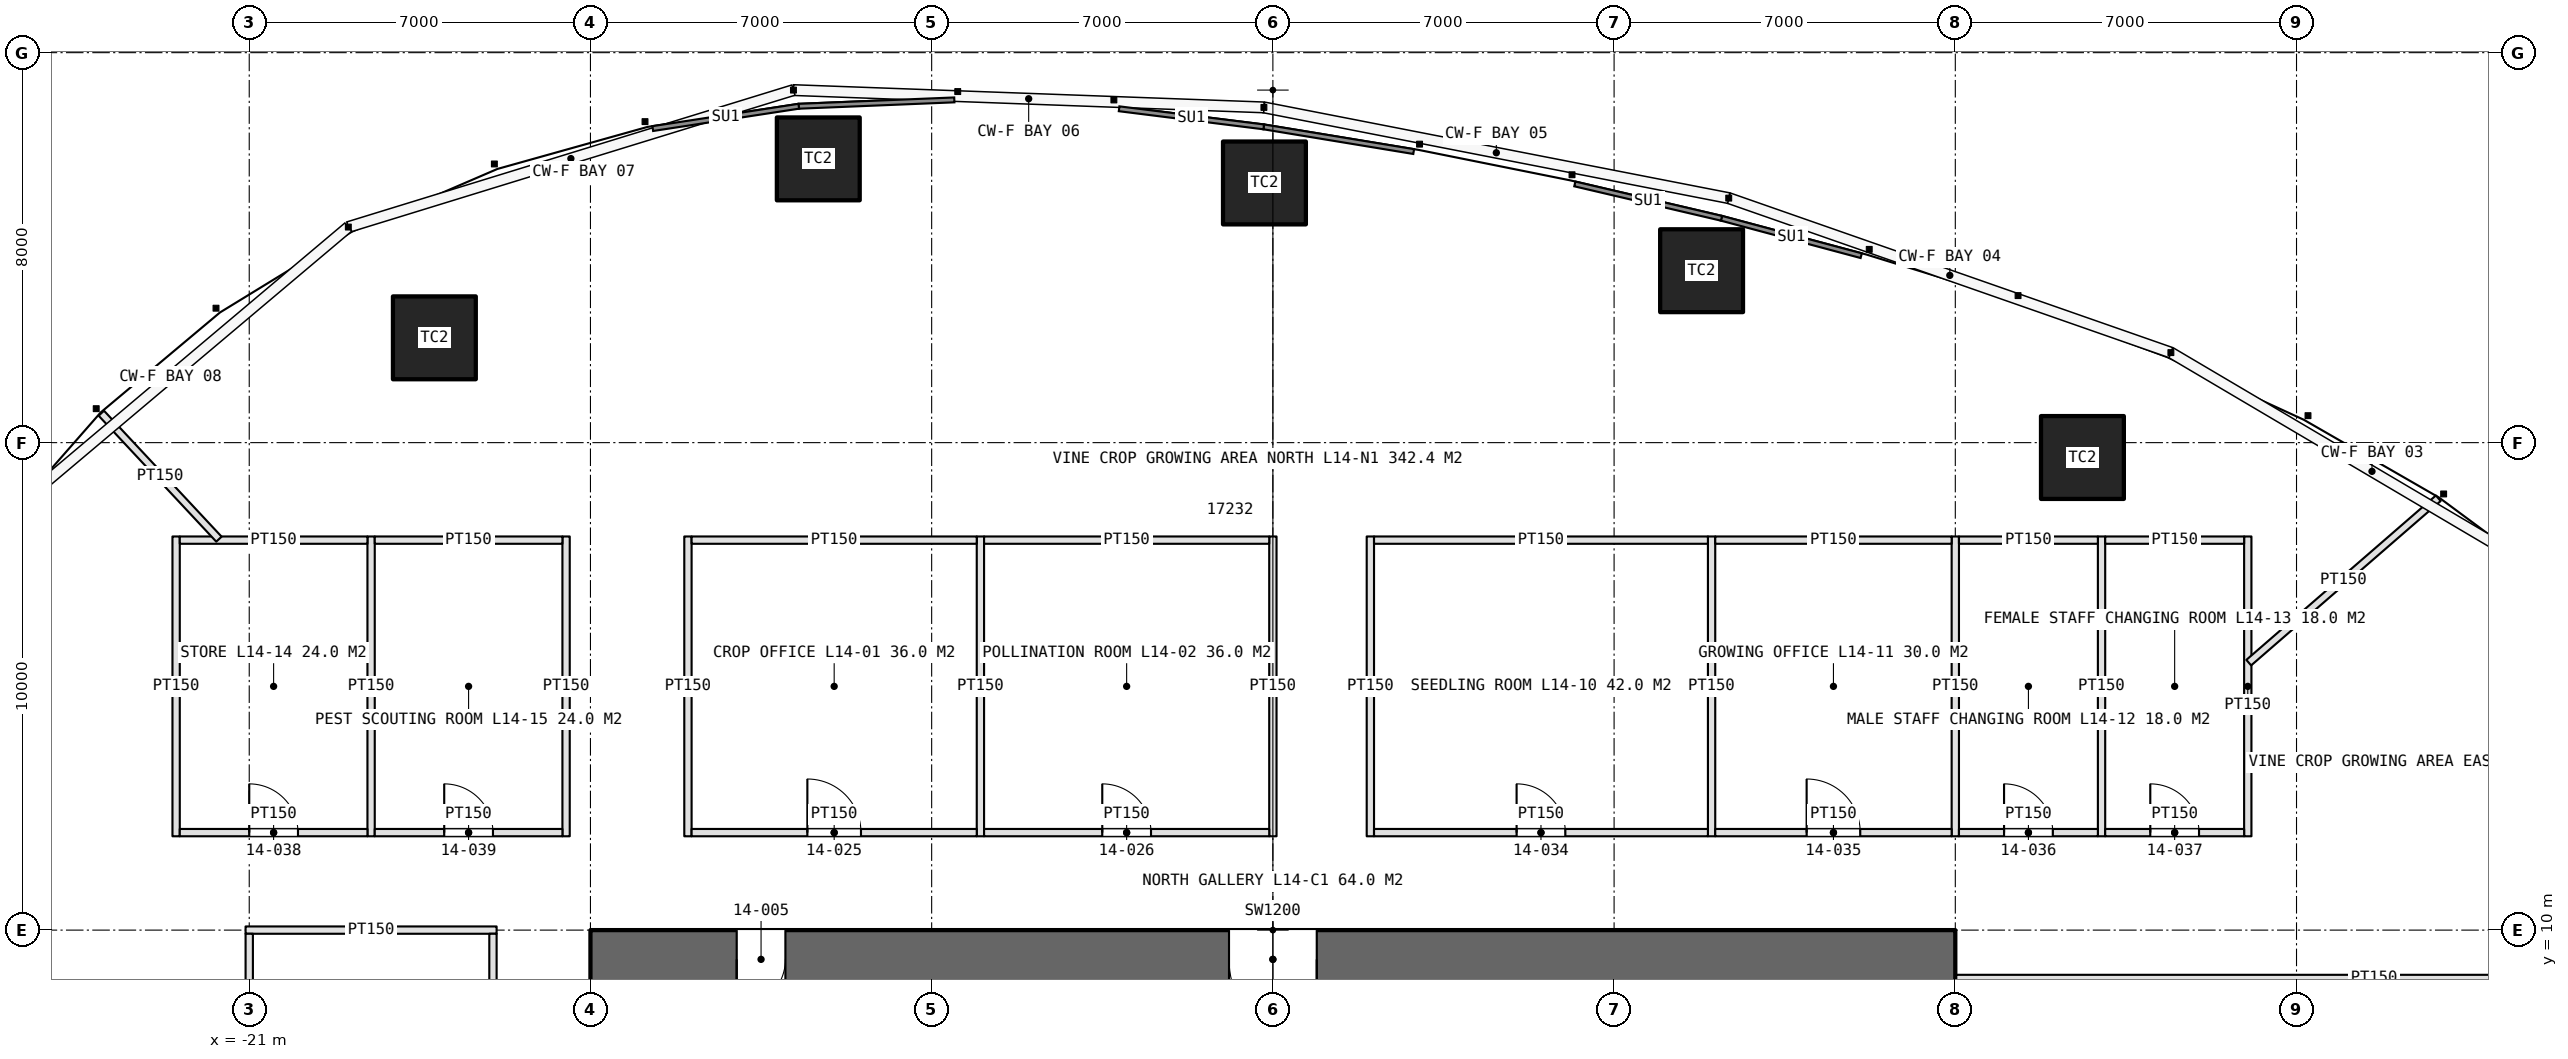
"""IFC4 building model, lengths in metres.
Left out: names, types, materials, properties, quantities, classifications, styles, units other than length and angle.
Written with IfcOpenShell. Run it as: python <this file> out.ifc"""

import sys

from ifc_helpers import new_model, si_unit, direction, frame, frame_2d, origin, origin_2d, place, context, subcontext, project, spatial, rectangle, extrude, element, fill, save


model = new_model("IFC4")
c1 = context("Model", 3, precision=1e-05, world=origin(), true_north=direction((0.0, 1.0)))
c2 = subcontext(c1, "Body", "Model", "MODEL_VIEW")
j1 = project(units=[si_unit("LENGTHUNIT", "METRE"), si_unit("PLANEANGLEUNIT", "RADIAN")], contexts=[c1])
p1 = place(None, origin())
s1 = spatial("IfcSite", under=j1, at=p1, CompositionType="ELEMENT")
p2 = place(p1, origin())
s2 = spatial("IfcBuilding", under=s1, at=p2, CompositionType="ELEMENT")
p3 = place(p2, frame((0.0, 0.0, 70.0)))
s3 = spatial("IfcBuildingStorey", under=s2, at=p3, CompositionType="ELEMENT", Elevation=70.0)
p4 = place(p3, frame((14.0, 9.4, 0.0), z_axis=(0.0, 0.0, 1.0), x_axis=(-1.0, 0.0, 0.0)))
e1 = element("IfcWall", 1, at=p4, inside=s3, PredefinedType="SHEAR", context=c2, shape_type="SweptSolid", body=[
    extrude(rectangle(XDim=28.0, YDim=1.2, at=frame_2d((14.0, 0.0))), origin(), (0.0, 0.0, 1.0), 5.0),
])
p5 = place(p4, frame((24.0, 0.0, 0.0)))
e2 = element("IfcOpeningElement", 2, at=p5, cuts=e1, PredefinedType="OPENING", context=c2, shape_type="SweptSolid", body=[
    extrude(rectangle(XDim=1.0, YDim=2.4, at=frame_2d((0.5, 1.2))), frame((0.0, 0.61, 0.0), z_axis=(0.0, -1.0, 0.0), x_axis=(1.0, 0.0, 0.0)), (0.0, 0.0, 1.0), 1.22),
])
p6 = place(p4, frame((13.1, 0.0, 0.0)))
e3 = element("IfcOpeningElement", 3, at=p6, cuts=e1, PredefinedType="OPENING", context=c2, shape_type="SweptSolid", body=[
    extrude(rectangle(XDim=1.8, YDim=2.4, at=frame_2d((0.9, 1.2))), frame((0.0, 0.61, 0.0), z_axis=(0.0, -1.0, 0.0), x_axis=(1.0, 0.0, 0.0)), (0.0, 0.0, 1.0), 1.22),
])
for number, where, z_axis, x_axis in (
    (4, (16.608, 19.695, 0.0), (0.0, 0.0, 1.0), (1.0, 0.0, 0.0)),
    (5, (8.795, 23.527, 0.0), (0.0, 0.0, 1.0), (1.0, 0.0, 0.0)),
    (6, (-0.173, 25.327, 0.0), (0.0, 0.0, 1.0), (1.0, 0.0, 0.0)),
    (7, (-9.326, 25.821, 0.0), (0.0, 0.0, 1.0), (1.0, 0.0, 0.0)),
    (8, (-17.202, 22.15, 0.0), (0.0, 0.0, 1.0), (1.0, 0.0, 0.0)),
):
    element("IfcColumn", number, at=place(p3, frame(where, z_axis=z_axis, x_axis=x_axis)), inside=s3, PredefinedType="COLUMN", context=c2, shape_type="SweptSolid", body=[
        extrude(rectangle(XDim=1.7, YDim=1.7, at=origin_2d()), origin(), (0.0, 0.0, 1.0), 5.0),
    ])
for number, where, z_axis, x_axis in (
    (9, (-12.0, 11.925, 0.0), (0.0, 0.0, 1.0), (0.0, 1.0, 0.0)),
    (10, (-6.0, 11.925, 0.0), (0.0, 0.0, 1.0), (0.0, 1.0, 0.0)),
    (11, (0.0, 11.925, 0.0), (0.0, 0.0, 1.0), (0.0, 1.0, 0.0)),
):
    element("IfcWall", number, at=place(p3, frame(where, z_axis=z_axis, x_axis=x_axis)), inside=s3, PredefinedType="PARTITIONING", context=c2, shape_type="SweptSolid", body=[
        extrude(rectangle(XDim=6.15, YDim=0.15, at=frame_2d((3.075, 0.0))), origin(), (0.0, 0.0, 1.0), 3.6),
    ])
p7 = place(p3, frame((-11.925, 12.0, 0.0), z_axis=(0.0, 0.0, 1.0), x_axis=(1.0, 0.0, 0.0)))
e12 = element("IfcWall", 12, at=p7, inside=s3, PredefinedType="PARTITIONING", context=c2, shape_type="SweptSolid", body=[
    extrude(rectangle(XDim=5.85, YDim=0.15, at=frame_2d((2.925, 0.0))), origin(), (0.0, 0.0, 1.0), 3.6),
])
p8 = place(p7, frame((2.375, 0.0, 0.0)))
e13 = element("IfcOpeningElement", 13, at=p8, cuts=e12, PredefinedType="OPENING", context=c2, shape_type="SweptSolid", body=[
    extrude(rectangle(XDim=1.1, YDim=2.3, at=frame_2d((0.55, 1.15))), frame((0.0, 0.085, 0.0), z_axis=(0.0, -1.0, 0.0), x_axis=(1.0, 0.0, 0.0)), (0.0, 0.0, 1.0), 0.17),
])
p9 = place(p3, frame((-11.925, 18.0, 0.0), z_axis=(0.0, 0.0, 1.0), x_axis=(1.0, 0.0, 0.0)))
e14 = element("IfcWall", 14, at=p9, inside=s3, PredefinedType="PARTITIONING", context=c2, shape_type="SweptSolid", body=[
    extrude(rectangle(XDim=5.85, YDim=0.15, at=frame_2d((2.925, 0.0))), origin(), (0.0, 0.0, 1.0), 3.6),
])
p10 = place(p3, frame((-5.925, 12.0, 0.0), z_axis=(0.0, 0.0, 1.0), x_axis=(1.0, 0.0, 0.0)))
e15 = element("IfcWall", 15, at=p10, inside=s3, PredefinedType="PARTITIONING", context=c2, shape_type="SweptSolid", body=[
    extrude(rectangle(XDim=5.85, YDim=0.15, at=frame_2d((2.925, 0.0))), origin(), (0.0, 0.0, 1.0), 3.6),
])
p11 = place(p10, frame((2.425, 0.0, 0.0)))
e16 = element("IfcOpeningElement", 16, at=p11, cuts=e15, PredefinedType="OPENING", context=c2, shape_type="SweptSolid", body=[
    extrude(rectangle(XDim=1.0, YDim=2.2, at=frame_2d((0.5, 1.1))), frame((0.0, 0.085, 0.0), z_axis=(0.0, -1.0, 0.0), x_axis=(1.0, 0.0, 0.0)), (0.0, 0.0, 1.0), 0.17),
])
p12 = place(p3, frame((-5.925, 18.0, 0.0), z_axis=(0.0, 0.0, 1.0), x_axis=(1.0, 0.0, 0.0)))
e17 = element("IfcWall", 17, at=p12, inside=s3, PredefinedType="PARTITIONING", context=c2, shape_type="SweptSolid", body=[
    extrude(rectangle(XDim=5.85, YDim=0.15, at=frame_2d((2.925, 0.0))), origin(), (0.0, 0.0, 1.0), 3.6),
])
for number, where, z_axis, x_axis in (
    (18, (2.0, 11.925, 0.0), (0.0, 0.0, 1.0), (0.0, 1.0, 0.0)),
    (19, (9.0, 11.925, 0.0), (0.0, 0.0, 1.0), (0.0, 1.0, 0.0)),
    (20, (14.0, 11.925, 0.0), (0.0, 0.0, 1.0), (0.0, 1.0, 0.0)),
    (21, (17.0, 11.925, 0.0), (0.0, 0.0, 1.0), (0.0, 1.0, 0.0)),
    (22, (20.0, 11.925, 0.0), (0.0, 0.0, 1.0), (0.0, 1.0, 0.0)),
):
    element("IfcWall", number, at=place(p3, frame(where, z_axis=z_axis, x_axis=x_axis)), inside=s3, PredefinedType="PARTITIONING", context=c2, shape_type="SweptSolid", body=[
        extrude(rectangle(XDim=6.15, YDim=0.15, at=frame_2d((3.075, 0.0))), origin(), (0.0, 0.0, 1.0), 3.6),
    ])
p13 = place(p3, frame((2.075, 12.0, 0.0), z_axis=(0.0, 0.0, 1.0), x_axis=(1.0, 0.0, 0.0)))
e23 = element("IfcWall", 23, at=p13, inside=s3, PredefinedType="PARTITIONING", context=c2, shape_type="SweptSolid", body=[
    extrude(rectangle(XDim=6.85, YDim=0.15, at=frame_2d((3.425, 0.0))), origin(), (0.0, 0.0, 1.0), 3.6),
])
p14 = place(p13, frame((2.925, 0.0, 0.0)))
e24 = element("IfcOpeningElement", 24, at=p14, cuts=e23, PredefinedType="OPENING", context=c2, shape_type="SweptSolid", body=[
    extrude(rectangle(XDim=1.0, YDim=2.2, at=frame_2d((0.5, 1.1))), frame((0.0, 0.085, 0.0), z_axis=(0.0, -1.0, 0.0), x_axis=(1.0, 0.0, 0.0)), (0.0, 0.0, 1.0), 0.17),
])
p15 = place(p3, frame((2.075, 18.0, 0.0), z_axis=(0.0, 0.0, 1.0), x_axis=(1.0, 0.0, 0.0)))
e25 = element("IfcWall", 25, at=p15, inside=s3, PredefinedType="PARTITIONING", context=c2, shape_type="SweptSolid", body=[
    extrude(rectangle(XDim=6.85, YDim=0.15, at=frame_2d((3.425, 0.0))), origin(), (0.0, 0.0, 1.0), 3.6),
])
p16 = place(p3, frame((9.075, 12.0, 0.0), z_axis=(0.0, 0.0, 1.0), x_axis=(1.0, 0.0, 0.0)))
e26 = element("IfcWall", 26, at=p16, inside=s3, PredefinedType="PARTITIONING", context=c2, shape_type="SweptSolid", body=[
    extrude(rectangle(XDim=4.85, YDim=0.15, at=frame_2d((2.425, 0.0))), origin(), (0.0, 0.0, 1.0), 3.6),
])
p17 = place(p16, frame((1.875, 0.0, 0.0)))
e27 = element("IfcOpeningElement", 27, at=p17, cuts=e26, PredefinedType="OPENING", context=c2, shape_type="SweptSolid", body=[
    extrude(rectangle(XDim=1.1, YDim=2.3, at=frame_2d((0.55, 1.15))), frame((0.0, 0.085, 0.0), z_axis=(0.0, -1.0, 0.0), x_axis=(1.0, 0.0, 0.0)), (0.0, 0.0, 1.0), 0.17),
])
p18 = place(p3, frame((9.075, 18.0, 0.0), z_axis=(0.0, 0.0, 1.0), x_axis=(1.0, 0.0, 0.0)))
e28 = element("IfcWall", 28, at=p18, inside=s3, PredefinedType="PARTITIONING", context=c2, shape_type="SweptSolid", body=[
    extrude(rectangle(XDim=4.85, YDim=0.15, at=frame_2d((2.425, 0.0))), origin(), (0.0, 0.0, 1.0), 3.6),
])
p19 = place(p3, frame((14.075, 12.0, 0.0), z_axis=(0.0, 0.0, 1.0), x_axis=(1.0, 0.0, 0.0)))
e29 = element("IfcWall", 29, at=p19, inside=s3, PredefinedType="PARTITIONING", context=c2, shape_type="SweptSolid", body=[
    extrude(rectangle(XDim=2.85, YDim=0.15, at=frame_2d((1.425, 0.0))), origin(), (0.0, 0.0, 1.0), 3.6),
])
p20 = place(p19, frame((0.925, 0.0, 0.0)))
e30 = element("IfcOpeningElement", 30, at=p20, cuts=e29, PredefinedType="OPENING", context=c2, shape_type="SweptSolid", body=[
    extrude(rectangle(XDim=1.0, YDim=2.2, at=frame_2d((0.5, 1.1))), frame((0.0, 0.085, 0.0), z_axis=(0.0, -1.0, 0.0), x_axis=(1.0, 0.0, 0.0)), (0.0, 0.0, 1.0), 0.17),
])
p21 = place(p3, frame((14.075, 18.0, 0.0), z_axis=(0.0, 0.0, 1.0), x_axis=(1.0, 0.0, 0.0)))
e31 = element("IfcWall", 31, at=p21, inside=s3, PredefinedType="PARTITIONING", context=c2, shape_type="SweptSolid", body=[
    extrude(rectangle(XDim=2.85, YDim=0.15, at=frame_2d((1.425, 0.0))), origin(), (0.0, 0.0, 1.0), 3.6),
])
p22 = place(p3, frame((17.075, 12.0, 0.0), z_axis=(0.0, 0.0, 1.0), x_axis=(1.0, 0.0, 0.0)))
e32 = element("IfcWall", 32, at=p22, inside=s3, PredefinedType="PARTITIONING", context=c2, shape_type="SweptSolid", body=[
    extrude(rectangle(XDim=2.85, YDim=0.15, at=frame_2d((1.425, 0.0))), origin(), (0.0, 0.0, 1.0), 3.6),
])
p23 = place(p22, frame((0.925, 0.0, 0.0)))
e33 = element("IfcOpeningElement", 33, at=p23, cuts=e32, PredefinedType="OPENING", context=c2, shape_type="SweptSolid", body=[
    extrude(rectangle(XDim=1.0, YDim=2.2, at=frame_2d((0.5, 1.1))), frame((0.0, 0.085, 0.0), z_axis=(0.0, -1.0, 0.0), x_axis=(1.0, 0.0, 0.0)), (0.0, 0.0, 1.0), 0.17),
])
p24 = place(p3, frame((17.075, 18.0, 0.0), z_axis=(0.0, 0.0, 1.0), x_axis=(1.0, 0.0, 0.0)))
e34 = element("IfcWall", 34, at=p24, inside=s3, PredefinedType="PARTITIONING", context=c2, shape_type="SweptSolid", body=[
    extrude(rectangle(XDim=2.85, YDim=0.15, at=frame_2d((1.425, 0.0))), origin(), (0.0, 0.0, 1.0), 3.6),
])
for number, where, z_axis, x_axis in (
    (35, (-22.5, 11.925, 0.0), (0.0, 0.0, 1.0), (0.0, 1.0, 0.0)),
    (36, (-18.5, 11.925, 0.0), (0.0, 0.0, 1.0), (0.0, 1.0, 0.0)),
    (37, (-14.5, 11.925, 0.0), (0.0, 0.0, 1.0), (0.0, 1.0, 0.0)),
):
    element("IfcWall", number, at=place(p3, frame(where, z_axis=z_axis, x_axis=x_axis)), inside=s3, PredefinedType="PARTITIONING", context=c2, shape_type="SweptSolid", body=[
        extrude(rectangle(XDim=6.15, YDim=0.15, at=frame_2d((3.075, 0.0))), origin(), (0.0, 0.0, 1.0), 3.6),
    ])
p25 = place(p3, frame((-22.425, 12.0, 0.0), z_axis=(0.0, 0.0, 1.0), x_axis=(1.0, 0.0, 0.0)))
e38 = element("IfcWall", 38, at=p25, inside=s3, PredefinedType="PARTITIONING", context=c2, shape_type="SweptSolid", body=[
    extrude(rectangle(XDim=3.85, YDim=0.15, at=frame_2d((1.925, 0.0))), origin(), (0.0, 0.0, 1.0), 3.6),
])
p26 = place(p25, frame((1.425, 0.0, 0.0)))
e39 = element("IfcOpeningElement", 39, at=p26, cuts=e38, PredefinedType="OPENING", context=c2, shape_type="SweptSolid", body=[
    extrude(rectangle(XDim=1.0, YDim=2.2, at=frame_2d((0.5, 1.1))), frame((0.0, 0.085, 0.0), z_axis=(0.0, -1.0, 0.0), x_axis=(1.0, 0.0, 0.0)), (0.0, 0.0, 1.0), 0.17),
])
p27 = place(p3, frame((-22.425, 18.0, 0.0), z_axis=(0.0, 0.0, 1.0), x_axis=(1.0, 0.0, 0.0)))
e40 = element("IfcWall", 40, at=p27, inside=s3, PredefinedType="PARTITIONING", context=c2, shape_type="SweptSolid", body=[
    extrude(rectangle(XDim=3.85, YDim=0.15, at=frame_2d((1.925, 0.0))), origin(), (0.0, 0.0, 1.0), 3.6),
])
p28 = place(p3, frame((-18.425, 12.0, 0.0), z_axis=(0.0, 0.0, 1.0), x_axis=(1.0, 0.0, 0.0)))
e41 = element("IfcWall", 41, at=p28, inside=s3, PredefinedType="PARTITIONING", context=c2, shape_type="SweptSolid", body=[
    extrude(rectangle(XDim=3.85, YDim=0.15, at=frame_2d((1.925, 0.0))), origin(), (0.0, 0.0, 1.0), 3.6),
])
p29 = place(p28, frame((1.425, 0.0, 0.0)))
e42 = element("IfcOpeningElement", 42, at=p29, cuts=e41, PredefinedType="OPENING", context=c2, shape_type="SweptSolid", body=[
    extrude(rectangle(XDim=1.0, YDim=2.2, at=frame_2d((0.5, 1.1))), frame((0.0, 0.085, 0.0), z_axis=(0.0, -1.0, 0.0), x_axis=(1.0, 0.0, 0.0)), (0.0, 0.0, 1.0), 0.17),
])
p30 = place(p3, frame((-18.425, 18.0, 0.0), z_axis=(0.0, 0.0, 1.0), x_axis=(1.0, 0.0, 0.0)))
e43 = element("IfcWall", 43, at=p30, inside=s3, PredefinedType="PARTITIONING", context=c2, shape_type="SweptSolid", body=[
    extrude(rectangle(XDim=3.85, YDim=0.15, at=frame_2d((1.925, 0.0))), origin(), (0.0, 0.0, 1.0), 3.6),
])
p31 = place(p3, frame((-15.925, 10.0, 0.0), z_axis=(0.0, 0.0, 1.0), x_axis=(-1.0, 0.0, 0.0)))
e44 = element("IfcWall", 44, at=p31, inside=s3, PredefinedType="PARTITIONING", context=c2, shape_type="SweptSolid", body=[
    extrude(rectangle(XDim=5.15, YDim=0.15, at=frame_2d((2.575, 0.0))), origin(), (0.0, 0.0, 1.0), 3.6),
])
p32 = place(p3, frame((-16.0, 3.075, 0.0), z_axis=(0.0, 0.0, 1.0), x_axis=(0.0, 1.0, 0.0)))
e45 = element("IfcWall", 45, at=p32, inside=s3, PredefinedType="PARTITIONING", context=c2, shape_type="SweptSolid", body=[
    extrude(rectangle(XDim=6.85, YDim=0.15, at=frame_2d((3.425, 0.0))), origin(), (0.0, 0.0, 1.0), 3.6),
])
p33 = place(p32, frame((2.825, 0.0, 0.0)))
e46 = element("IfcOpeningElement", 46, at=p33, cuts=e45, PredefinedType="OPENING", context=c2, shape_type="SweptSolid", body=[
    extrude(rectangle(XDim=1.2, YDim=2.3, at=frame_2d((0.6, 1.15))), frame((0.0, 0.085, 0.0), z_axis=(0.0, -1.0, 0.0), x_axis=(1.0, 0.0, 0.0)), (0.0, 0.0, 1.0), 0.17),
])
p34 = place(p3, frame((-21.0, 3.075, 0.0), z_axis=(0.0, 0.0, 1.0), x_axis=(0.0, 1.0, 0.0)))
e47 = element("IfcWall", 47, at=p34, inside=s3, PredefinedType="PARTITIONING", context=c2, shape_type="SweptSolid", body=[
    extrude(rectangle(XDim=6.85, YDim=0.15, at=frame_2d((3.425, 0.0))), origin(), (0.0, 0.0, 1.0), 3.6),
])
p35 = place(p3, frame((-21.622, 18.02, 0.0), z_axis=(0.0, 0.0, 1.0), x_axis=(-0.682522451791, 0.730864626864, 0.0)))
e48 = element("IfcWall", 48, at=p35, inside=s3, PredefinedType="PARTITIONING", context=c2, shape_type="SweptSolid", body=[
    extrude(rectangle(XDim=3.535, YDim=0.15, at=frame_2d((1.768, 0.0))), origin(), (0.0, 0.0, 1.0), 3.6),
])
p36 = place(p3, frame((20.02, 15.487, 0.0), z_axis=(0.0, 0.0, 1.0), x_axis=(0.755443308786, 0.655214016342, 0.0)))
e49 = element("IfcWall", 49, at=p36, inside=s3, PredefinedType="PARTITIONING", context=c2, shape_type="SweptSolid", body=[
    extrude(rectangle(XDim=5.147, YDim=0.15, at=frame_2d((2.573, 0.0))), origin(), (0.0, 0.0, 1.0), 3.6),
])
p37 = place(p3, frame((14.02, 9.008, 0.0), z_axis=(0.0, 0.0, 1.0), x_axis=(1.0, 0.0, 0.0)))
e50 = element("IfcWall", 50, at=p37, inside=s3, PredefinedType="PARTITIONING", context=c2, shape_type="SweptSolid", body=[
    extrude(rectangle(XDim=17.146, YDim=0.15, at=frame_2d((8.573, 0.0))), origin(), (0.0, 0.0, 1.0), 3.6),
])
p38 = place(p5, origin())
e51 = element("IfcDoor", 51, at=p38, inside=s3, OperationType="SINGLE_SWING_RIGHT", PredefinedType="DOOR", context=c2, shape_type="SweptSolid", body=[
    extrude(rectangle(XDim=1.0, YDim=2.4, at=frame_2d((0.5, 1.2))), frame((0.0, 0.025, 0.0), z_axis=(0.0, -1.0, 0.0), x_axis=(1.0, 0.0, 0.0)), (0.0, 0.0, 1.0), 0.05),
])
fill(e2, e51)
p39 = place(p6, origin())
e52 = element("IfcDoor", 52, at=p39, inside=s3, OperationType="DOUBLE_DOOR_SINGLE_SWING", PredefinedType="DOOR", context=c2, shape_type="SweptSolid", body=[
    extrude(rectangle(XDim=1.8, YDim=2.4, at=frame_2d((0.9, 1.2))), frame((0.0, 0.025, 0.0), z_axis=(0.0, -1.0, 0.0), x_axis=(1.0, 0.0, 0.0)), (0.0, 0.0, 1.0), 0.05),
])
fill(e3, e52)
p40 = place(p8, origin())
e53 = element("IfcDoor", 53, at=p40, inside=s3, OperationType="SINGLE_SWING_LEFT", PredefinedType="DOOR", context=c2, shape_type="SweptSolid", body=[
    extrude(rectangle(XDim=1.1, YDim=2.3, at=frame_2d((0.55, 1.15))), frame((0.0, 0.025, 0.0), z_axis=(0.0, -1.0, 0.0), x_axis=(1.0, 0.0, 0.0)), (0.0, 0.0, 1.0), 0.05),
])
fill(e13, e53)
p41 = place(p11, origin())
e54 = element("IfcDoor", 54, at=p41, inside=s3, OperationType="SINGLE_SWING_LEFT", PredefinedType="DOOR", context=c2, shape_type="SweptSolid", body=[
    extrude(rectangle(XDim=1.0, YDim=2.2, at=frame_2d((0.5, 1.1))), frame((0.0, 0.025, 0.0), z_axis=(0.0, -1.0, 0.0), x_axis=(1.0, 0.0, 0.0)), (0.0, 0.0, 1.0), 0.05),
])
fill(e16, e54)
p42 = place(p14, origin())
e55 = element("IfcDoor", 55, at=p42, inside=s3, OperationType="SINGLE_SWING_LEFT", PredefinedType="DOOR", context=c2, shape_type="SweptSolid", body=[
    extrude(rectangle(XDim=1.0, YDim=2.2, at=frame_2d((0.5, 1.1))), frame((0.0, 0.025, 0.0), z_axis=(0.0, -1.0, 0.0), x_axis=(1.0, 0.0, 0.0)), (0.0, 0.0, 1.0), 0.05),
])
fill(e24, e55)
p43 = place(p17, origin())
e56 = element("IfcDoor", 56, at=p43, inside=s3, OperationType="SINGLE_SWING_LEFT", PredefinedType="DOOR", context=c2, shape_type="SweptSolid", body=[
    extrude(rectangle(XDim=1.1, YDim=2.3, at=frame_2d((0.55, 1.15))), frame((0.0, 0.025, 0.0), z_axis=(0.0, -1.0, 0.0), x_axis=(1.0, 0.0, 0.0)), (0.0, 0.0, 1.0), 0.05),
])
fill(e27, e56)
p44 = place(p20, origin())
e57 = element("IfcDoor", 57, at=p44, inside=s3, OperationType="SINGLE_SWING_LEFT", PredefinedType="DOOR", context=c2, shape_type="SweptSolid", body=[
    extrude(rectangle(XDim=1.0, YDim=2.2, at=frame_2d((0.5, 1.1))), frame((0.0, 0.025, 0.0), z_axis=(0.0, -1.0, 0.0), x_axis=(1.0, 0.0, 0.0)), (0.0, 0.0, 1.0), 0.05),
])
fill(e30, e57)
p45 = place(p23, origin())
e58 = element("IfcDoor", 58, at=p45, inside=s3, OperationType="SINGLE_SWING_LEFT", PredefinedType="DOOR", context=c2, shape_type="SweptSolid", body=[
    extrude(rectangle(XDim=1.0, YDim=2.2, at=frame_2d((0.5, 1.1))), frame((0.0, 0.025, 0.0), z_axis=(0.0, -1.0, 0.0), x_axis=(1.0, 0.0, 0.0)), (0.0, 0.0, 1.0), 0.05),
])
fill(e33, e58)
p46 = place(p26, origin())
e59 = element("IfcDoor", 59, at=p46, inside=s3, OperationType="SINGLE_SWING_LEFT", PredefinedType="DOOR", context=c2, shape_type="SweptSolid", body=[
    extrude(rectangle(XDim=1.0, YDim=2.2, at=frame_2d((0.5, 1.1))), frame((0.0, 0.025, 0.0), z_axis=(0.0, -1.0, 0.0), x_axis=(1.0, 0.0, 0.0)), (0.0, 0.0, 1.0), 0.05),
])
fill(e39, e59)
p47 = place(p29, origin())
e60 = element("IfcDoor", 60, at=p47, inside=s3, OperationType="SINGLE_SWING_LEFT", PredefinedType="DOOR", context=c2, shape_type="SweptSolid", body=[
    extrude(rectangle(XDim=1.0, YDim=2.2, at=frame_2d((0.5, 1.1))), frame((0.0, 0.025, 0.0), z_axis=(0.0, -1.0, 0.0), x_axis=(1.0, 0.0, 0.0)), (0.0, 0.0, 1.0), 0.05),
])
fill(e42, e60)
save(model, sys.argv[1])
